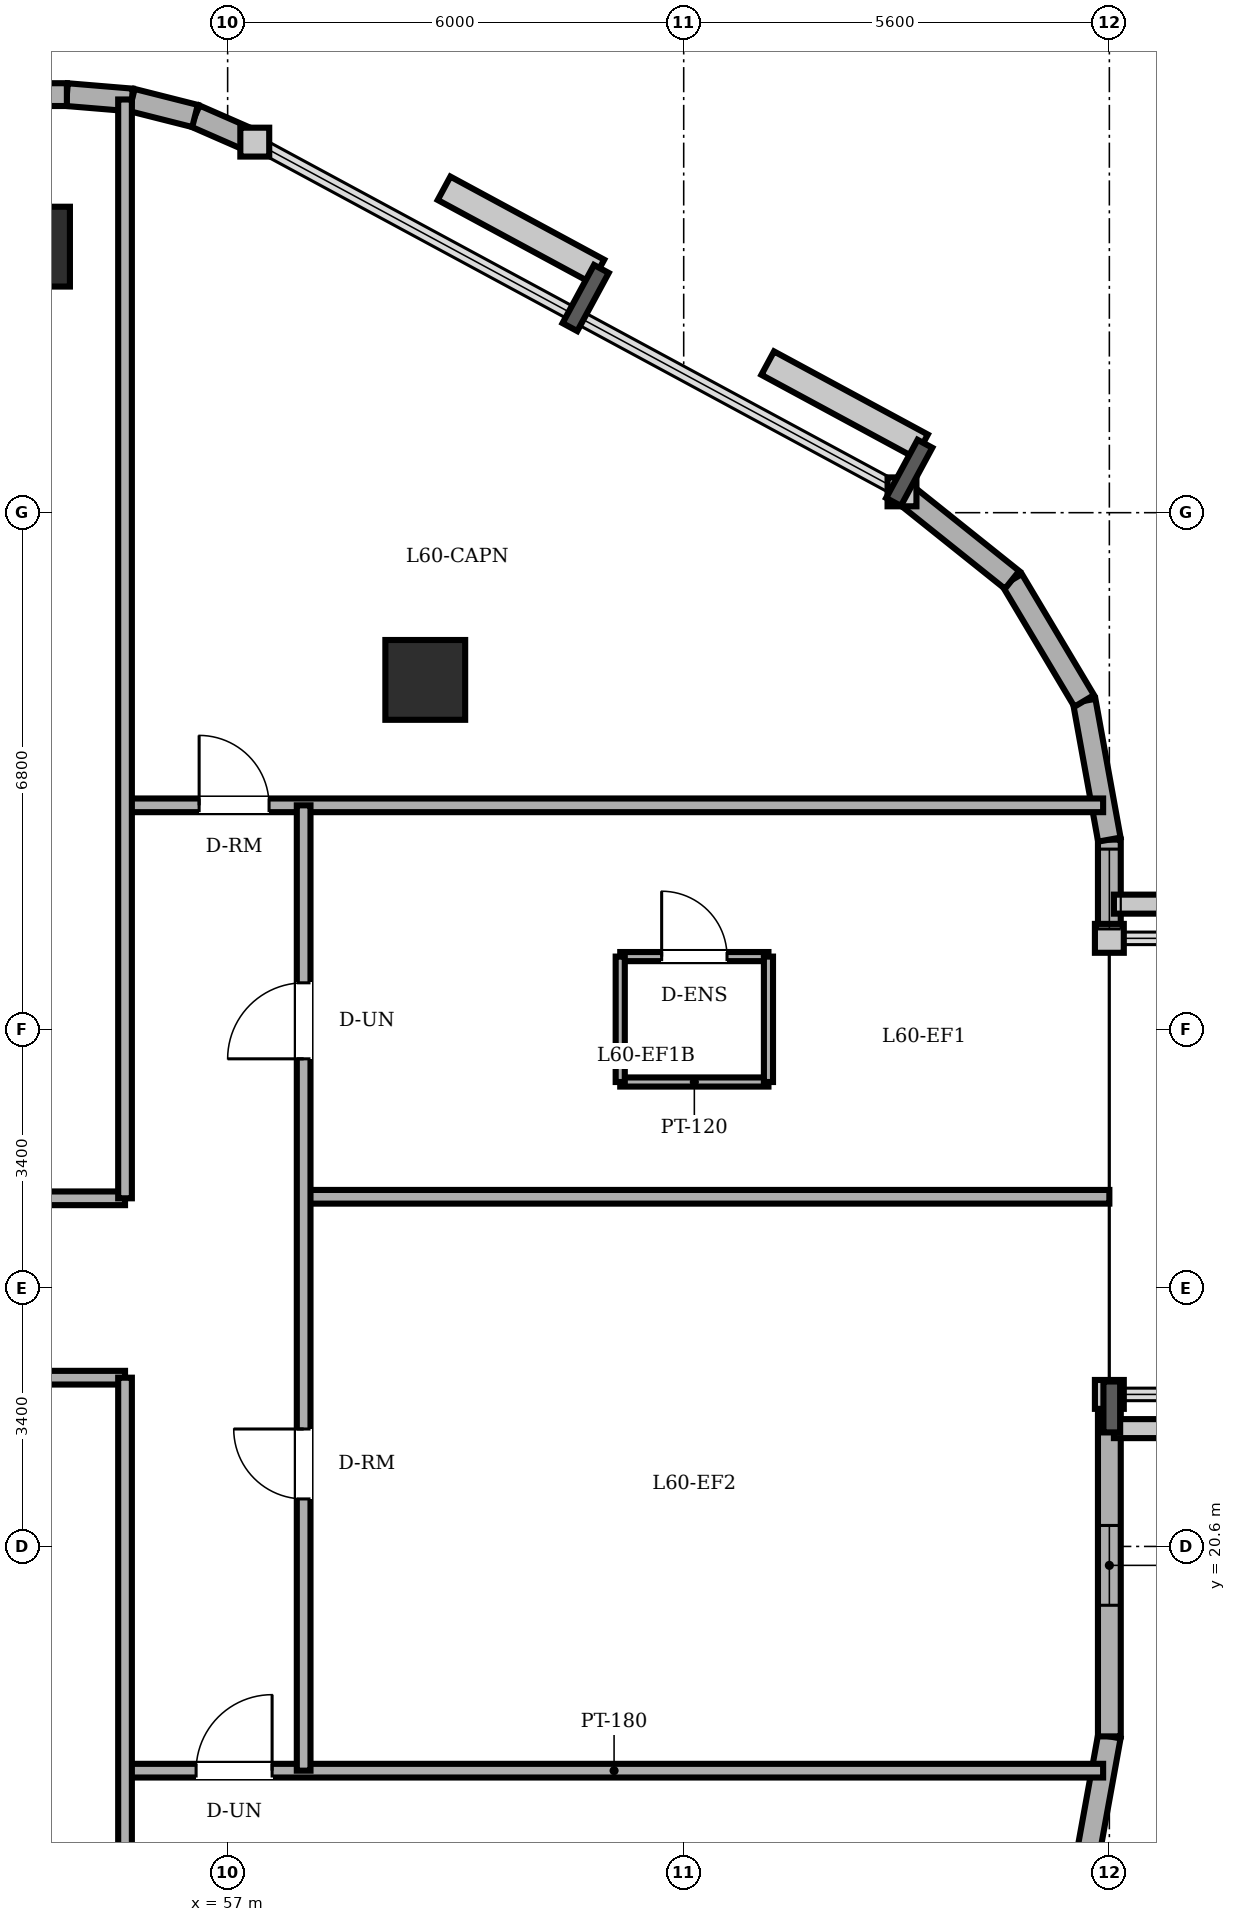
"""IFC4 building model, lengths in metres.
Left out: names, types, materials, properties, quantities, classifications, styles, units other than length and angle.
Written with IfcOpenShell. Run it as: python <this file> out.ifc"""

import sys

from ifc_helpers import new_model, si_unit, direction, frame, frame_2d, origin, origin_2d, place, context, subcontext, project, spatial, rectangle, circle, extrude, element, fill, save


model = new_model("IFC4")
c1 = context("Model", 3, precision=1e-05, world=origin(), true_north=direction((0.0, 1.0)))
c2 = subcontext(c1, "Body", "Model", "MODEL_VIEW")
j1 = project(units=[si_unit("LENGTHUNIT", "METRE"), si_unit("PLANEANGLEUNIT", "RADIAN")], contexts=[c1])
p1 = place(None, origin())
s1 = spatial("IfcSite", under=j1, at=p1, CompositionType="ELEMENT")
p2 = place(p1, origin())
s2 = spatial("IfcBuilding", under=s1, at=p2, CompositionType="ELEMENT")
p3 = place(p2, frame((0.0, 0.0, 230.1)))
s3 = spatial("IfcBuildingStorey", under=s2, at=p3, CompositionType="ELEMENT", Elevation=230.1)
for number, where, z_axis, x_axis in (
    (1, (59.6, 32.0, 0.0), (0.0, 0.0, 1.0), (1.0, 0.0, 0.0)),
    (2, (54.4, 37.7, 0.0), (0.0, 0.0, 1.0), (1.0, 0.0, 0.0)),
):
    element("IfcColumn", number, at=place(p3, frame(where, z_axis=z_axis, x_axis=x_axis)), inside=s3, PredefinedType="COLUMN", context=c2, shape_type="SweptSolid", body=[
        extrude(circle(Radius=0.525, at=origin_2d()), origin(), (0.0, 0.0, 1.0), 3.6),
    ])
p4 = place(p3, frame((68.269, 16.276, 0.0), z_axis=(0.0, 0.0, 1.0), x_axis=(0.178468469252, 0.983945631365, 0.0)))
e3 = element("IfcWall", 3, at=p4, inside=s3, PredefinedType="SOLIDWALL", context=c2, shape_type="SweptSolid", body=[
    extrude(rectangle(XDim=1.855, YDim=0.3, at=frame_2d((0.927, 0.0))), origin(), (0.0, 0.0, 1.0), 3.4),
])
p5 = place(p3, frame((68.6, 18.101, 0.0), z_axis=(0.0, 0.0, 1.0), x_axis=(0.0, 1.0, 0.0)))
e4 = element("IfcWall", 4, at=p5, inside=s3, PredefinedType="SOLIDWALL", context=c2, shape_type="SweptSolid", body=[
    extrude(rectangle(XDim=4.499, YDim=0.3, at=frame_2d((2.25, 0.0))), origin(), (0.0, 0.0, 1.0), 3.4),
])
p6 = place(p5, frame((1.725, 0.0, 0.85)))
e5 = element("IfcOpeningElement", 5, at=p6, cuts=e4, PredefinedType="OPENING", context=c2, shape_type="SweptSolid", body=[
    extrude(rectangle(XDim=1.05, YDim=1.55, at=frame_2d((0.525, 0.775))), frame((0.0, 0.16, 0.0), z_axis=(0.0, -1.0, 0.0), x_axis=(1.0, 0.0, 0.0)), (0.0, 0.0, 1.0), 0.32),
])
p7 = place(p3, frame((68.6, 28.6, 0.0), z_axis=(0.0, 0.0, 1.0), x_axis=(0.0, 1.0, 0.0)))
e6 = element("IfcWall", 6, at=p7, inside=s3, PredefinedType="SOLIDWALL", context=c2, shape_type="SweptSolid", body=[
    extrude(rectangle(XDim=1.299, YDim=0.3, at=frame_2d((0.649, 0.0))), origin(), (0.0, 0.0, 1.0), 3.4),
])
p8 = place(p7, frame((0.124, 0.0, 0.85)))
e7 = element("IfcOpeningElement", 7, at=p8, cuts=e6, PredefinedType="OPENING", context=c2, shape_type="SweptSolid", body=[
    extrude(rectangle(XDim=1.05, YDim=1.55, at=frame_2d((0.525, 0.775))), frame((0.0, 0.16, 0.0), z_axis=(0.0, -1.0, 0.0), x_axis=(1.0, 0.0, 0.0)), (0.0, 0.0, 1.0), 0.32),
])
p9 = place(p3, frame((68.6, 29.899, 0.0), z_axis=(0.0, 0.0, 1.0), x_axis=(-0.178468469252, 0.983945631365, 0.0)))
e8 = element("IfcWall", 8, at=p9, inside=s3, PredefinedType="SOLIDWALL", context=c2, shape_type="SweptSolid", body=[
    extrude(rectangle(XDim=1.855, YDim=0.3, at=frame_2d((0.927, 0.0))), origin(), (0.0, 0.0, 1.0), 3.4),
])
p10 = place(p3, frame((68.269, 31.724, 0.0), z_axis=(0.0, 0.0, 1.0), x_axis=(-0.512072018927, 0.858942516955, 0.0)))
e9 = element("IfcWall", 9, at=p10, inside=s3, PredefinedType="SOLIDWALL", context=c2, shape_type="SweptSolid", body=[
    extrude(rectangle(XDim=1.853, YDim=0.3, at=frame_2d((0.927, 0.0))), origin(), (0.0, 0.0, 1.0), 3.4),
])
p11 = place(p3, frame((67.32, 33.316, 0.0), z_axis=(0.0, 0.0, 1.0), x_axis=(-0.780920189257, 0.624630817372, 0.0)))
e10 = element("IfcWall", 10, at=p11, inside=s3, PredefinedType="SOLIDWALL", context=c2, shape_type="SweptSolid", body=[
    extrude(rectangle(XDim=1.854, YDim=0.3, at=frame_2d((0.927, 0.0))), origin(), (0.0, 0.0, 1.0), 3.4),
])
p12 = place(p3, frame((57.357, 39.075, 0.0), z_axis=(0.0, 0.0, 1.0), x_axis=(-0.916085473636, 0.400983048261, 0.0)))
e11 = element("IfcWall", 11, at=p12, inside=s3, PredefinedType="SOLIDWALL", context=c2, shape_type="SweptSolid", body=[
    extrude(rectangle(XDim=0.858, YDim=0.3, at=frame_2d((0.429, 0.0))), origin(), (0.0, 0.0, 1.0), 3.4),
])
p13 = place(p3, frame((56.571, 39.419, 0.0), z_axis=(0.0, 0.0, 1.0), x_axis=(-0.969536346338, 0.244947490555, 0.0)))
e12 = element("IfcWall", 12, at=p13, inside=s3, PredefinedType="SOLIDWALL", context=c2, shape_type="SweptSolid", body=[
    extrude(rectangle(XDim=0.857, YDim=0.3, at=frame_2d((0.429, 0.0))), origin(), (0.0, 0.0, 1.0), 3.4),
])
p14 = place(p3, frame((55.74, 39.629, 0.0), z_axis=(0.0, 0.0, 1.0), x_axis=(-0.996565355958, 0.082809971041, 0.0)))
e13 = element("IfcWall", 13, at=p14, inside=s3, PredefinedType="SOLIDWALL", context=c2, shape_type="SweptSolid", body=[
    extrude(rectangle(XDim=0.858, YDim=0.3, at=frame_2d((0.429, 0.0))), origin(), (0.0, 0.0, 1.0), 3.4),
])
p15 = place(p3, frame((54.885, 39.7, 0.0), z_axis=(0.0, 0.0, 1.0), x_axis=(-1.0, 0.0, 0.0)))
e14 = element("IfcWall", 14, at=p15, inside=s3, PredefinedType="SOLIDWALL", context=c2, shape_type="SweptSolid", body=[
    extrude(rectangle(XDim=32.485, YDim=0.3, at=frame_2d((16.243, 0.0))), origin(), (0.0, 0.0, 1.0), 3.4),
])
p16 = place(p15, frame((26.122, 0.0, 0.0)))
e15 = element("IfcOpeningElement", 15, at=p16, cuts=e14, PredefinedType="OPENING", context=c2, shape_type="SweptSolid", body=[
    extrude(rectangle(XDim=0.95, YDim=2.2, at=frame_2d((0.475, 1.1))), frame((0.0, 0.16, 0.0), z_axis=(0.0, -1.0, 0.0), x_axis=(1.0, 0.0, 0.0)), (0.0, 0.0, 1.0), 0.32),
])
p17 = place(p15, frame((4.57, 0.0, 0.85)))
e16 = element("IfcOpeningElement", 16, at=p17, cuts=e14, PredefinedType="OPENING", context=c2, shape_type="SweptSolid", body=[
    extrude(rectangle(XDim=1.35, YDim=1.55, at=frame_2d((0.675, 0.775))), frame((0.0, 0.16, 0.0), z_axis=(0.0, -1.0, 0.0), x_axis=(1.0, 0.0, 0.0)), (0.0, 0.0, 1.0), 0.32),
])
p18 = place(p15, frame((9.465, 0.0, 0.85)))
e17 = element("IfcOpeningElement", 17, at=p18, cuts=e14, PredefinedType="OPENING", context=c2, shape_type="SweptSolid", body=[
    extrude(rectangle(XDim=1.35, YDim=1.55, at=frame_2d((0.675, 0.775))), frame((0.0, 0.16, 0.0), z_axis=(0.0, -1.0, 0.0), x_axis=(1.0, 0.0, 0.0)), (0.0, 0.0, 1.0), 0.32),
])
p19 = place(p15, frame((16.577, 0.0, 0.85)))
e18 = element("IfcOpeningElement", 18, at=p19, cuts=e14, PredefinedType="OPENING", context=c2, shape_type="SweptSolid", body=[
    extrude(rectangle(XDim=1.35, YDim=1.55, at=frame_2d((0.675, 0.775))), frame((0.0, 0.16, 0.0), z_axis=(0.0, -1.0, 0.0), x_axis=(1.0, 0.0, 0.0)), (0.0, 0.0, 1.0), 0.32),
])
p20 = place(p15, frame((18.793, 0.0, 0.85)))
e19 = element("IfcOpeningElement", 19, at=p20, cuts=e14, PredefinedType="OPENING", context=c2, shape_type="SweptSolid", body=[
    extrude(rectangle(XDim=1.35, YDim=1.55, at=frame_2d((0.675, 0.775))), frame((0.0, 0.16, 0.0), z_axis=(0.0, -1.0, 0.0), x_axis=(1.0, 0.0, 0.0)), (0.0, 0.0, 1.0), 0.32),
])
p21 = place(p15, frame((22.91, 0.0, 0.85)))
e20 = element("IfcOpeningElement", 20, at=p21, cuts=e14, PredefinedType="OPENING", context=c2, shape_type="SweptSolid", body=[
    extrude(rectangle(XDim=1.35, YDim=1.55, at=frame_2d((0.675, 0.775))), frame((0.0, 0.16, 0.0), z_axis=(0.0, -1.0, 0.0), x_axis=(1.0, 0.0, 0.0)), (0.0, 0.0, 1.0), 0.32),
])
p22 = place(p15, frame((29.835, 0.0, 0.85)))
e21 = element("IfcOpeningElement", 21, at=p22, cuts=e14, PredefinedType="OPENING", context=c2, shape_type="SweptSolid", body=[
    extrude(rectangle(XDim=1.35, YDim=1.55, at=frame_2d((0.675, 0.775))), frame((0.0, 0.16, 0.0), z_axis=(0.0, -1.0, 0.0), x_axis=(1.0, 0.0, 0.0)), (0.0, 0.0, 1.0), 0.32),
])
p23 = place(p3, frame((62.165, 28.36, 0.0), z_axis=(0.0, 0.0, 1.0), x_axis=(1.0, 0.0, 0.0)))
e22 = element("IfcWall", 22, at=p23, inside=s3, PredefinedType="PARTITIONING", context=c2, shape_type="SweptSolid", body=[
    extrude(rectangle(XDim=1.95, YDim=0.12, at=frame_2d((0.975, 0.0))), origin(), (0.0, 0.0, 1.0), 3.4),
])
p24 = place(p23, frame((0.545, 0.0, 0.0)))
e23 = element("IfcOpeningElement", 23, at=p24, cuts=e22, PredefinedType="OPENING", context=c2, shape_type="SweptSolid", body=[
    extrude(rectangle(XDim=0.86, YDim=2.1, at=frame_2d((0.43, 1.05))), frame((0.0, 0.07, 0.0), z_axis=(0.0, -1.0, 0.0), x_axis=(1.0, 0.0, 0.0)), (0.0, 0.0, 1.0), 0.14),
])
p25 = place(p3, frame((64.115, 26.71, 0.0), z_axis=(0.0, 0.0, 1.0), x_axis=(-1.0, 0.0, 0.0)))
e24 = element("IfcWall", 24, at=p25, inside=s3, PredefinedType="PARTITIONING", context=c2, shape_type="SweptSolid", body=[
    extrude(rectangle(XDim=1.95, YDim=0.12, at=frame_2d((0.975, 0.0))), origin(), (0.0, 0.0, 1.0), 3.4),
])
for number, where, z_axis, x_axis in (
    (25, (62.165, 28.36, 0.0), (0.0, 0.0, 1.0), (0.0, -1.0, 0.0)),
    (26, (64.115, 26.71, 0.0), (0.0, 0.0, 1.0), (0.0, 1.0, 0.0)),
):
    element("IfcWall", number, at=place(p3, frame(where, z_axis=z_axis, x_axis=x_axis)), inside=s3, PredefinedType="PARTITIONING", context=c2, shape_type="SweptSolid", body=[
        extrude(rectangle(XDim=1.65, YDim=0.12, at=frame_2d((0.825, 0.0))), origin(), (0.0, 0.0, 1.0), 3.4),
    ])
p26 = place(p3, frame((55.65, 17.65, 0.0), z_axis=(0.0, 0.0, 1.0), x_axis=(1.0, 0.0, 0.0)))
e27 = element("IfcWall", 27, at=p26, inside=s3, PredefinedType="PARTITIONING", context=c2, shape_type="SweptSolid", body=[
    extrude(rectangle(XDim=12.868, YDim=0.18, at=frame_2d((6.434, 0.0))), origin(), (0.0, 0.0, 1.0), 3.4),
])
p27 = place(p26, frame((0.935, 0.0, 0.0)))
e28 = element("IfcOpeningElement", 28, at=p27, cuts=e27, PredefinedType="OPENING", context=c2, shape_type="SweptSolid", body=[
    extrude(rectangle(XDim=1.0, YDim=2.15, at=frame_2d((0.5, 1.075))), frame((0.0, 0.1, 0.0), z_axis=(0.0, -1.0, 0.0), x_axis=(1.0, 0.0, 0.0)), (0.0, 0.0, 1.0), 0.2),
])
p28 = place(p3, frame((39.85, 22.82, 0.0), z_axis=(0.0, 0.0, 1.0), x_axis=(1.0, 0.0, 0.0)))
e29 = element("IfcWall", 29, at=p28, inside=s3, PredefinedType="PARTITIONING", context=c2, shape_type="SweptSolid", body=[
    extrude(rectangle(XDim=15.8, YDim=0.18, at=frame_2d((7.9, 0.0))), origin(), (0.0, 0.0, 1.0), 3.4),
])
p29 = place(p28, frame((7.44, 0.0, 0.0)))
e30 = element("IfcOpeningElement", 30, at=p29, cuts=e29, PredefinedType="OPENING", context=c2, shape_type="SweptSolid", body=[
    extrude(rectangle(XDim=0.92, YDim=2.1, at=frame_2d((0.46, 1.05))), frame((0.0, 0.1, 0.0), z_axis=(0.0, -1.0, 0.0), x_axis=(1.0, 0.0, 0.0)), (0.0, 0.0, 1.0), 0.2),
])
p30 = place(p3, frame((39.85, 25.18, 0.0), z_axis=(0.0, 0.0, 1.0), x_axis=(1.0, 0.0, 0.0)))
e31 = element("IfcWall", 31, at=p30, inside=s3, PredefinedType="PARTITIONING", context=c2, shape_type="SweptSolid", body=[
    extrude(rectangle(XDim=15.8, YDim=0.18, at=frame_2d((7.9, 0.0))), origin(), (0.0, 0.0, 1.0), 3.4),
])
p31 = place(p30, frame((7.44, 0.0, 0.0)))
e32 = element("IfcOpeningElement", 32, at=p31, cuts=e31, PredefinedType="OPENING", context=c2, shape_type="SweptSolid", body=[
    extrude(rectangle(XDim=0.92, YDim=2.1, at=frame_2d((0.46, 1.05))), frame((0.0, 0.1, 0.0), z_axis=(0.0, -1.0, 0.0), x_axis=(1.0, 0.0, 0.0)), (0.0, 0.0, 1.0), 0.2),
])
p32 = place(p3, frame((58.0, 25.2, 0.0), z_axis=(0.0, 0.0, 1.0), x_axis=(1.0, 0.0, 0.0)))
e33 = element("IfcWall", 33, at=p32, inside=s3, PredefinedType="PARTITIONING", context=c2, shape_type="SweptSolid", body=[
    extrude(rectangle(XDim=10.6, YDim=0.18, at=frame_2d((5.3, 0.0))), origin(), (0.0, 0.0, 1.0), 3.4),
])
p33 = place(p3, frame((55.65, 30.35, 0.0), z_axis=(0.0, 0.0, 1.0), x_axis=(1.0, 0.0, 0.0)))
e34 = element("IfcWall", 34, at=p33, inside=s3, PredefinedType="PARTITIONING", context=c2, shape_type="SweptSolid", body=[
    extrude(rectangle(XDim=12.868, YDim=0.18, at=frame_2d((6.434, 0.0))), origin(), (0.0, 0.0, 1.0), 3.4),
])
p34 = place(p33, frame((0.975, 0.0, 0.0)))
e35 = element("IfcOpeningElement", 35, at=p34, cuts=e34, PredefinedType="OPENING", context=c2, shape_type="SweptSolid", body=[
    extrude(rectangle(XDim=0.92, YDim=2.1, at=frame_2d((0.46, 1.05))), frame((0.0, 0.1, 0.0), z_axis=(0.0, -1.0, 0.0), x_axis=(1.0, 0.0, 0.0)), (0.0, 0.0, 1.0), 0.2),
])
for number, where, z_axis, x_axis in (
    (36, (55.65, 8.364, 0.0), (0.0, 0.0, 1.0), (0.0, 1.0, 0.0)),
    (37, (55.65, 25.18, 0.0), (0.0, 0.0, 1.0), (0.0, 1.0, 0.0)),
):
    element("IfcWall", number, at=place(p3, frame(where, z_axis=z_axis, x_axis=x_axis)), inside=s3, PredefinedType="PARTITIONING", context=c2, shape_type="SweptSolid", body=[
        extrude(rectangle(XDim=14.456, YDim=0.18, at=frame_2d((7.228, 0.0))), origin(), (0.0, 0.0, 1.0), 3.4),
    ])
p35 = place(p3, frame((58.0, 17.65, 0.0), z_axis=(0.0, 0.0, 1.0), x_axis=(0.0, 1.0, 0.0)))
e38 = element("IfcWall", 38, at=p35, inside=s3, PredefinedType="PARTITIONING", context=c2, shape_type="SweptSolid", body=[
    extrude(rectangle(XDim=12.7, YDim=0.18, at=frame_2d((6.35, 0.0))), origin(), (0.0, 0.0, 1.0), 3.4),
])
p36 = place(p35, frame((9.365, 0.0, 0.0)))
e39 = element("IfcOpeningElement", 39, at=p36, cuts=e38, PredefinedType="OPENING", context=c2, shape_type="SweptSolid", body=[
    extrude(rectangle(XDim=1.0, YDim=2.15, at=frame_2d((0.5, 1.075))), frame((0.0, 0.1, 0.0), z_axis=(0.0, -1.0, 0.0), x_axis=(1.0, 0.0, 0.0)), (0.0, 0.0, 1.0), 0.2),
])
p37 = place(p35, frame((3.575, 0.0, 0.0)))
e40 = element("IfcOpeningElement", 40, at=p37, cuts=e38, PredefinedType="OPENING", context=c2, shape_type="SweptSolid", body=[
    extrude(rectangle(XDim=0.92, YDim=2.1, at=frame_2d((0.46, 1.05))), frame((0.0, 0.1, 0.0), z_axis=(0.0, -1.0, 0.0), x_axis=(1.0, 0.0, 0.0)), (0.0, 0.0, 1.0), 0.2),
])
p38 = place(p6, origin())
e41 = element("IfcWindow", 41, at=p38, inside=s3, PartitioningType="SINGLE_PANEL", PredefinedType="WINDOW", context=c2, shape_type="SweptSolid", body=[
    extrude(rectangle(XDim=1.05, YDim=1.55, at=frame_2d((0.525, 0.775))), frame((0.0, 0.03, 0.0), z_axis=(0.0, -1.0, 0.0), x_axis=(1.0, 0.0, 0.0)), (0.0, 0.0, 1.0), 0.06),
])
fill(e5, e41)
p39 = place(p8, origin())
e42 = element("IfcWindow", 42, at=p39, inside=s3, PartitioningType="SINGLE_PANEL", PredefinedType="WINDOW", context=c2, shape_type="SweptSolid", body=[
    extrude(rectangle(XDim=1.05, YDim=1.55, at=frame_2d((0.525, 0.775))), frame((0.0, 0.03, 0.0), z_axis=(0.0, -1.0, 0.0), x_axis=(1.0, 0.0, 0.0)), (0.0, 0.0, 1.0), 0.06),
])
fill(e7, e42)
p40 = place(p24, origin())
e43 = element("IfcDoor", 43, at=p40, inside=s3, OperationType="SINGLE_SWING_LEFT", PredefinedType="DOOR", context=c2, shape_type="SweptSolid", body=[
    extrude(rectangle(XDim=0.86, YDim=2.1, at=frame_2d((0.43, 1.05))), frame((0.0, 0.025, 0.0), z_axis=(0.0, -1.0, 0.0), x_axis=(1.0, 0.0, 0.0)), (0.0, 0.0, 1.0), 0.05),
])
fill(e23, e43)
p41 = place(p34, origin())
e44 = element("IfcDoor", 44, at=p41, inside=s3, OperationType="SINGLE_SWING_LEFT", PredefinedType="DOOR", context=c2, shape_type="SweptSolid", body=[
    extrude(rectangle(XDim=0.92, YDim=2.1, at=frame_2d((0.46, 1.05))), frame((0.0, 0.025, 0.0), z_axis=(0.0, -1.0, 0.0), x_axis=(1.0, 0.0, 0.0)), (0.0, 0.0, 1.0), 0.05),
])
fill(e35, e44)
p42 = place(p27, origin())
e45 = element("IfcDoor", 45, at=p42, inside=s3, OperationType="SINGLE_SWING_RIGHT", PredefinedType="DOOR", context=c2, shape_type="SweptSolid", body=[
    extrude(rectangle(XDim=1.0, YDim=2.15, at=frame_2d((0.5, 1.075))), frame((0.0, 0.025, 0.0), z_axis=(0.0, -1.0, 0.0), x_axis=(1.0, 0.0, 0.0)), (0.0, 0.0, 1.0), 0.05),
])
fill(e28, e45)
p43 = place(p36, origin())
e46 = element("IfcDoor", 46, at=p43, inside=s3, OperationType="SINGLE_SWING_LEFT", PredefinedType="DOOR", context=c2, shape_type="SweptSolid", body=[
    extrude(rectangle(XDim=1.0, YDim=2.15, at=frame_2d((0.5, 1.075))), frame((0.0, 0.025, 0.0), z_axis=(0.0, -1.0, 0.0), x_axis=(1.0, 0.0, 0.0)), (0.0, 0.0, 1.0), 0.05),
])
fill(e39, e46)
p44 = place(p37, origin())
e47 = element("IfcDoor", 47, at=p44, inside=s3, OperationType="SINGLE_SWING_RIGHT", PredefinedType="DOOR", context=c2, shape_type="SweptSolid", body=[
    extrude(rectangle(XDim=0.92, YDim=2.1, at=frame_2d((0.46, 1.05))), frame((0.0, 0.025, 0.0), z_axis=(0.0, -1.0, 0.0), x_axis=(1.0, 0.0, 0.0)), (0.0, 0.0, 1.0), 0.05),
])
fill(e40, e47)
save(model, sys.argv[1])
